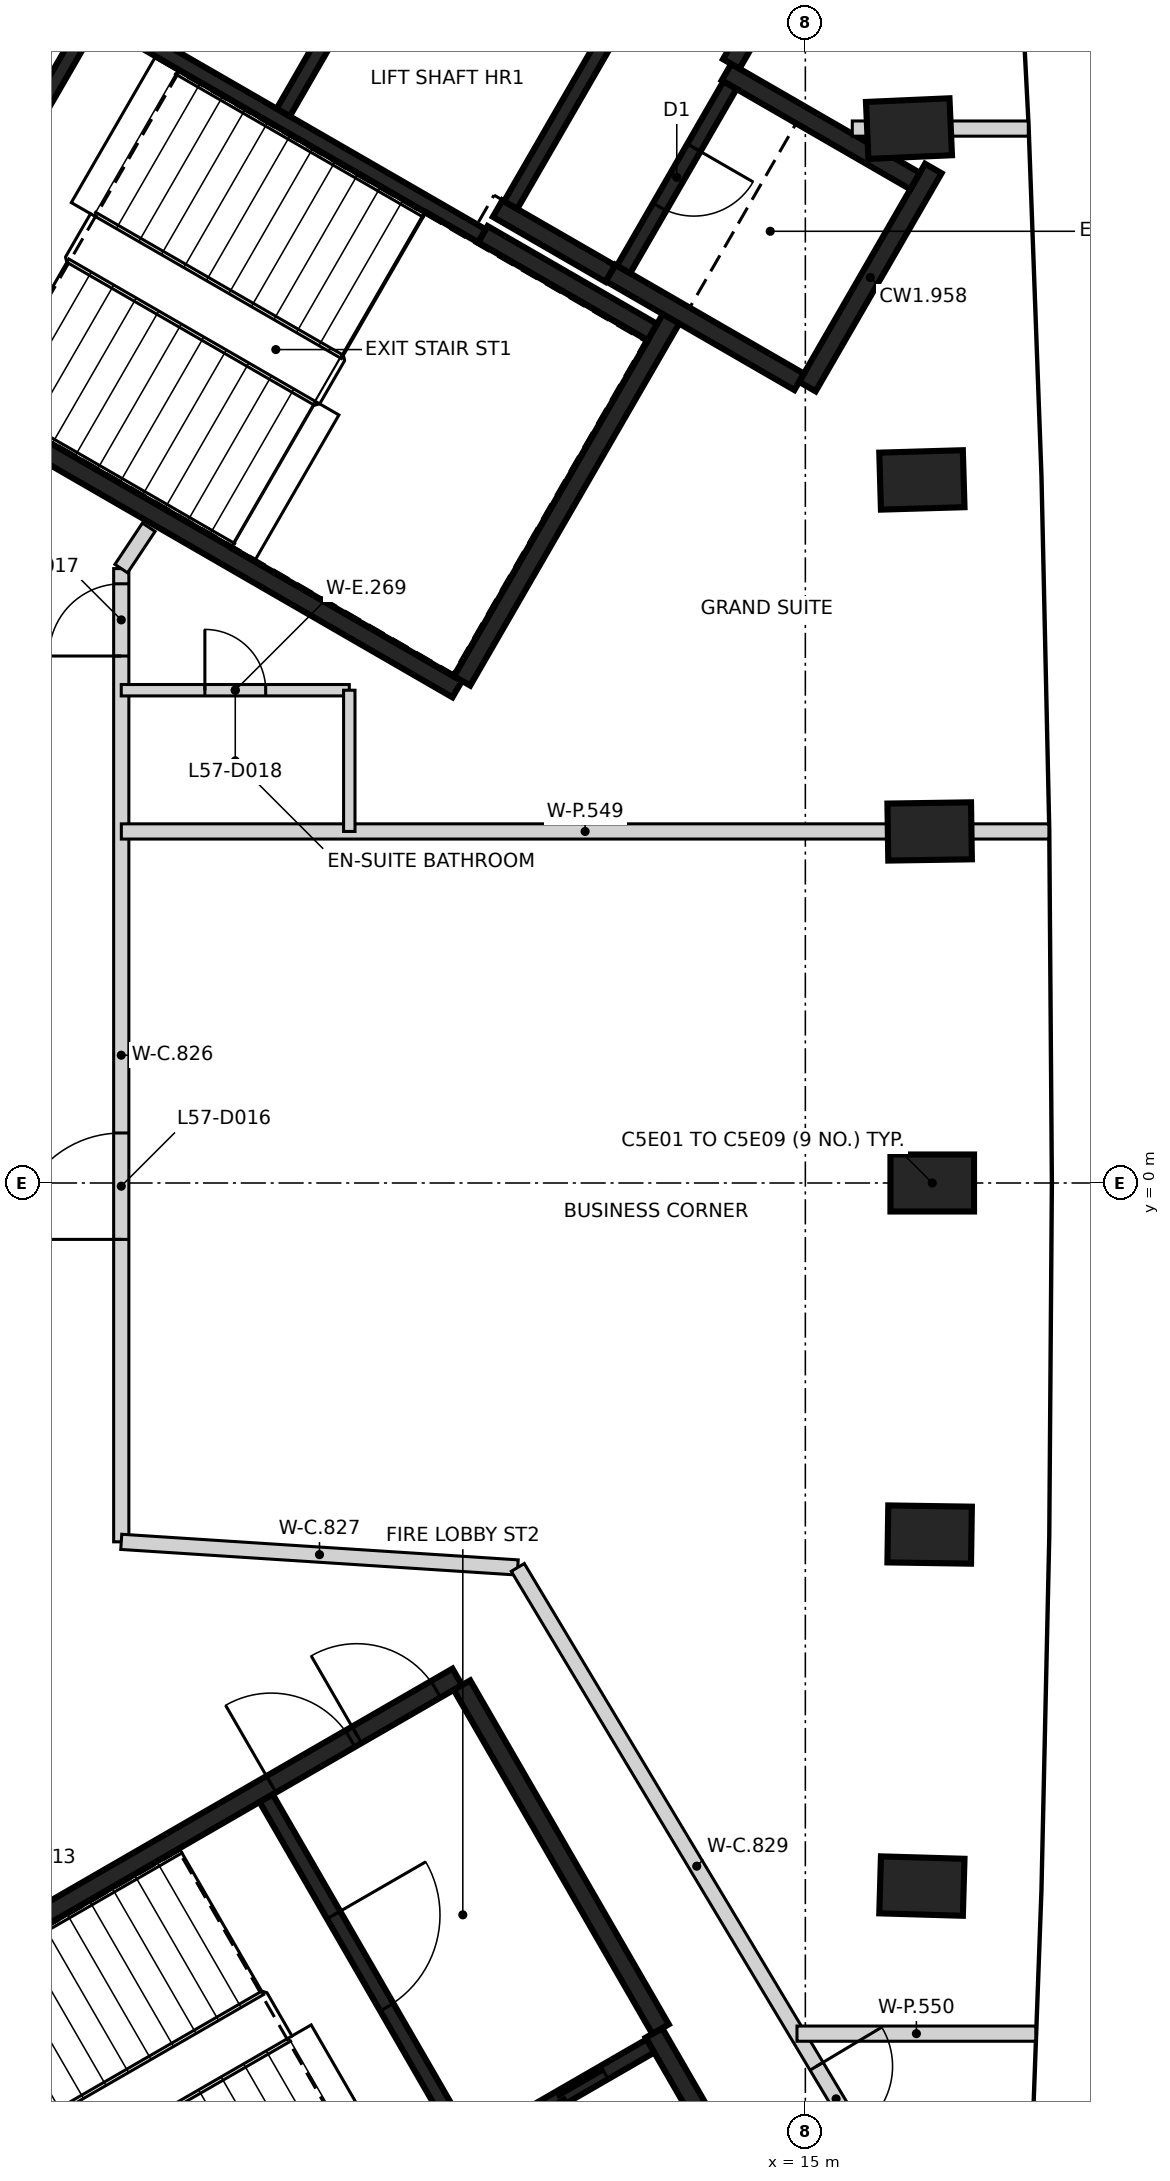
"""IFC4 building model, lengths in metres.
Left out: names, types, materials, properties, quantities, classifications, styles, units other than length and angle.
Written with IfcOpenShell. Run it as: python <this file> out.ifc"""

import sys

from ifc_helpers import new_model, si_unit, direction, frame, frame_2d, origin, origin_2d, place, context, subcontext, project, spatial, rectangle, extrude, element, fill, save


model = new_model("IFC4")
c1 = context("Model", 3, precision=1e-05, world=origin(), true_north=direction((0.0, 1.0)))
c2 = subcontext(c1, "Body", "Model", "MODEL_VIEW")
j1 = project(units=[si_unit("LENGTHUNIT", "METRE"), si_unit("PLANEANGLEUNIT", "RADIAN")], contexts=[c1])
p1 = place(None, origin())
s1 = spatial("IfcSite", under=j1, at=p1, CompositionType="ELEMENT")
p2 = place(p1, origin())
s2 = spatial("IfcBuilding", under=s1, at=p2, CompositionType="ELEMENT")
p3 = place(p2, frame((0.0, 0.0, 228.6)))
s3 = spatial("IfcBuildingStorey", under=s2, at=p3, CompositionType="ELEMENT", Elevation=228.6)
for number, where, z_axis, x_axis in (
    (1, (16.533, -9.25, -0.35), (0.0, 0.0, 1.0), (-1.0, 0.029, 0.0)),
    (2, (16.635, -4.625, -0.35), (0.0, 0.0, 1.0), (-1.0, 0.015, 0.0)),
    (3, (16.669, 0.0, -0.35), (0.0, 0.0, 1.0), (1.0, 0.0, 0.0)),
    (4, (16.635, 4.625, -0.35), (0.0, 0.0, 1.0), (1.0, 0.015, 0.0)),
    (5, (16.533, 9.25, -0.35), (0.0, 0.0, 1.0), (1.0, 0.029, 0.0)),
    (6, (16.363, 13.872, -0.35), (0.0, 0.0, 1.0), (0.999, 0.044, 0.0)),
):
    element("IfcColumn", number, at=place(p3, frame(where, z_axis=z_axis, x_axis=x_axis)), inside=s3, PredefinedType="COLUMN", context=c2, shape_type="SweptSolid", body=[
        extrude(rectangle(XDim=1.1, YDim=0.75, at=origin_2d()), origin(), (0.0, 0.0, 1.0), 3.6),
    ])
p4 = place(p3, frame((10.42, 6.498, 0.0), z_axis=(0.0, 0.0, 1.0), x_axis=(-0.866021906294, 0.500006057782, 0.0)))
e7 = element("IfcWall", 7, at=p4, inside=s3, PredefinedType="SHEAR", context=c2, shape_type="SweptSolid", body=[
    extrude(rectangle(XDim=11.55, YDim=0.25, at=frame_2d((5.775, 0.0))), origin(), (0.0, 0.0, 1.0), 3.25),
])
p5 = place(p4, frame((10.025, 0.0, 0.0)))
e8 = element("IfcOpeningElement", 8, at=p5, cuts=e7, PredefinedType="OPENING", context=c2, shape_type="SweptSolid", body=[
    extrude(rectangle(XDim=1.2, YDim=2.1, at=frame_2d((0.6, 1.05))), frame((0.0, 0.135, 0.0), z_axis=(0.0, -1.0, 0.0), x_axis=(1.0, 0.0, 0.0)), (0.0, 0.0, 1.0), 0.27),
])
p6 = place(p4, frame((8.725, 0.0, 0.0)))
e9 = element("IfcOpeningElement", 9, at=p6, cuts=e7, PredefinedType="OPENING", context=c2, shape_type="SweptSolid", body=[
    extrude(rectangle(XDim=1.2, YDim=2.1, at=frame_2d((0.6, 1.05))), frame((0.0, 0.135, 0.0), z_axis=(0.0, -1.0, 0.0), x_axis=(1.0, 0.0, 0.0)), (0.0, 0.0, 1.0), 0.27),
])
p7 = place(p3, frame((13.238, 11.378, 0.0), z_axis=(0.0, 0.0, 1.0), x_axis=(-0.500008851346, -0.866020293397, 0.0)))
e10 = element("IfcWall", 10, at=p7, inside=s3, PredefinedType="SHEAR", context=c2, shape_type="SweptSolid", body=[
    extrude(rectangle(XDim=5.51, YDim=0.25, at=frame_2d((2.755, 0.0))), origin(), (0.0, 0.0, 1.0), 3.25),
])
p8 = place(p3, frame((16.684, 13.347, 0.0), z_axis=(0.0, 0.0, 1.0), x_axis=(-0.499998874531, -0.866026053573, 0.0)))
e11 = element("IfcWall", 11, at=p8, inside=s3, PredefinedType="SHEAR", context=c2, shape_type="SweptSolid", body=[
    extrude(rectangle(XDim=3.313, YDim=0.25, at=frame_2d((1.656, 0.0))), origin(), (0.0, 0.0, 1.0), 3.25),
])
p9 = place(p3, frame((14.918, 10.54, 0.0), z_axis=(0.0, 0.0, 1.0), x_axis=(-0.866063538972, 0.499933942099, 0.0)))
e12 = element("IfcWall", 12, at=p9, inside=s3, PredefinedType="SHEAR", context=c2, shape_type="SweptSolid", body=[
    extrude(rectangle(XDim=2.865, YDim=0.25, at=frame_2d((1.432, 0.0))), origin(), (0.0, 0.0, 1.0), 3.25),
])
p10 = place(p3, frame((13.963, 14.614, 0.0), z_axis=(0.0, 0.0, 1.0), x_axis=(0.866042235819, -0.499970844928, 0.0)))
e13 = element("IfcWall", 13, at=p10, inside=s3, PredefinedType="SHEAR", context=c2, shape_type="SweptSolid", body=[
    extrude(rectangle(XDim=2.865, YDim=0.25, at=frame_2d((1.432, 0.0))), origin(), (0.0, 0.0, 1.0), 3.25),
])
p11 = place(p3, frame((10.757, 12.481, 0.0), z_axis=(0.0, 0.0, 1.0), x_axis=(0.866022940537, -0.500004266446, 0.0)))
e14 = element("IfcWall", 14, at=p11, inside=s3, PredefinedType="SHEAR", context=c2, shape_type="SweptSolid", body=[
    extrude(rectangle(XDim=2.575, YDim=0.25, at=frame_2d((1.287, 0.0))), origin(), (0.0, 0.0, 1.0), 3.25),
])
p12 = place(p3, frame((12.433, 11.964, 0.0), z_axis=(0.0, 0.0, 1.0), x_axis=(-0.866038183914, 0.499977863513, 0.0)))
e15 = element("IfcWall", 15, at=p12, inside=s3, PredefinedType="SHEAR", context=c2, shape_type="SweptSolid", body=[
    extrude(rectangle(XDim=1.71, YDim=0.25, at=frame_2d((0.855, 0.0))), origin(), (0.0, 0.0, 1.0), 3.25),
])
p13 = place(p3, frame((14.305, 15.207, 0.0), z_axis=(0.0, 0.0, 1.0), x_axis=(-0.499848422343, -0.866112899501, 0.0)))
e16 = element("IfcWall", 16, at=p13, inside=s3, PredefinedType="SHEAR", context=c2, shape_type="SweptSolid", body=[
    extrude(rectangle(XDim=0.559, YDim=0.25, at=frame_2d((0.28, 0.0))), origin(), (0.0, 0.0, 1.0), 3.25),
])
p14 = place(p3, frame((10.743, 12.46, 0.0), z_axis=(0.0, 0.0, 1.0), x_axis=(-0.866018848283, 0.500011354289, 0.0)))
e17 = element("IfcWall", 17, at=p14, inside=s3, PredefinedType="SHEAR", context=c2, shape_type="SweptSolid", body=[
    extrude(rectangle(XDim=5.974, YDim=0.2, at=frame_2d((2.987, 0.0))), origin(), (0.0, 0.0, 1.0), 3.25),
])
p15 = place(p3, frame((3.057, 10.895, 0.0), z_axis=(0.0, 0.0, 1.0), x_axis=(0.500027839223, 0.866009330205, 0.0)))
e18 = element("IfcWall", 18, at=p15, inside=s3, PredefinedType="SHEAR", context=c2, shape_type="SweptSolid", body=[
    extrude(rectangle(XDim=5.098, YDim=0.2, at=frame_2d((2.549, 0.0))), origin(), (0.0, 0.0, 1.0), 3.25),
])
p16 = place(p15, frame((1.774, 0.0, 0.0)))
e19 = element("IfcOpeningElement", 19, at=p16, cuts=e18, PredefinedType="OPENING", context=c2, shape_type="SweptSolid", body=[
    extrude(rectangle(XDim=1.4, YDim=2.1, at=frame_2d((0.7, 1.05))), frame((0.0, 0.11, 0.0), z_axis=(0.0, -1.0, 0.0), x_axis=(1.0, 0.0, 0.0)), (0.0, 0.0, 1.0), 0.22),
])
p17 = place(p3, frame((8.132, 14.084, 0.0), z_axis=(0.0, 0.0, 1.0), x_axis=(0.500030834389, 0.86600760081, 0.0)))
e20 = element("IfcWall", 20, at=p17, inside=s3, PredefinedType="SHEAR", context=c2, shape_type="SweptSolid", body=[
    extrude(rectangle(XDim=3.198, YDim=0.2, at=frame_2d((1.599, 0.0))), origin(), (0.0, 0.0, 1.0), 3.25),
])
p18 = place(p3, frame((14.008, 14.442, 0.0), z_axis=(0.0, 0.0, 1.0), x_axis=(-0.499986818241, -0.866033014143, 0.0)))
e21 = element("IfcWall", 21, at=p18, inside=s3, PredefinedType="SHEAR", context=c2, shape_type="SweptSolid", body=[
    extrude(rectangle(XDim=2.798, YDim=0.2, at=frame_2d((1.399, 0.0))), origin(), (0.0, 0.0, 1.0), 3.25),
])
p19 = place(p18, frame((0.949, 0.0, 0.0)))
e22 = element("IfcOpeningElement", 22, at=p19, cuts=e21, PredefinedType="OPENING", context=c2, shape_type="SweptSolid", body=[
    extrude(rectangle(XDim=0.9, YDim=2.1, at=frame_2d((0.45, 1.05))), frame((0.0, 0.11, 0.0), z_axis=(0.0, -1.0, 0.0), x_axis=(1.0, 0.0, 0.0)), (0.0, 0.0, 1.0), 0.22),
])
p20 = place(p3, frame((12.502, 15.255, 0.0), z_axis=(0.0, 0.0, 1.0), x_axis=(-0.499965018551, -0.866045599391, 0.0)))
e23 = element("IfcWall", 23, at=p20, inside=s3, PredefinedType="SHEAR", context=c2, shape_type="SweptSolid", body=[
    extrude(rectangle(XDim=2.759, YDim=0.2, at=frame_2d((1.379, 0.0))), origin(), (0.0, 0.0, 1.0), 3.25),
])
p21 = place(p3, frame((0.417, -12.273, 0.0), z_axis=(0.0, 0.0, 1.0), x_axis=(0.866021906294, 0.500006057782, 0.0)))
e24 = element("IfcWall", 24, at=p21, inside=s3, PredefinedType="SHEAR", context=c2, shape_type="SweptSolid", body=[
    extrude(rectangle(XDim=11.55, YDim=0.25, at=frame_2d((5.775, 0.0))), origin(), (0.0, 0.0, 1.0), 3.25),
])
p22 = place(p21, frame((10.025, 0.0, 0.0)))
e25 = element("IfcOpeningElement", 25, at=p22, cuts=e24, PredefinedType="OPENING", context=c2, shape_type="SweptSolid", body=[
    extrude(rectangle(XDim=1.2, YDim=2.1, at=frame_2d((0.6, 1.05))), frame((0.0, 0.135, 0.0), z_axis=(0.0, -1.0, 0.0), x_axis=(1.0, 0.0, 0.0)), (0.0, 0.0, 1.0), 0.27),
])
p23 = place(p21, frame((8.725, 0.0, 0.0)))
e26 = element("IfcOpeningElement", 26, at=p23, cuts=e24, PredefinedType="OPENING", context=c2, shape_type="SweptSolid", body=[
    extrude(rectangle(XDim=1.2, YDim=2.1, at=frame_2d((0.6, 1.05))), frame((0.0, 0.135, 0.0), z_axis=(0.0, -1.0, 0.0), x_axis=(1.0, 0.0, 0.0)), (0.0, 0.0, 1.0), 0.27),
])
p24 = place(p3, frame((13.008, -11.181, 0.0), z_axis=(0.0, 0.0, 1.0), x_axis=(0.500001955336, -0.866024274868, 0.0)))
e27 = element("IfcWall", 27, at=p24, inside=s3, PredefinedType="SHEAR", context=c2, shape_type="SweptSolid", body=[
    extrude(rectangle(XDim=6.125, YDim=0.25, at=frame_2d((3.062, 0.0))), origin(), (0.0, 0.0, 1.0), 3.25),
])
p25 = place(p24, frame((3.563, 0.0, 0.0)))
e28 = element("IfcOpeningElement", 28, at=p25, cuts=e27, PredefinedType="OPENING", context=c2, shape_type="SweptSolid", body=[
    extrude(rectangle(XDim=1.0, YDim=2.1, at=frame_2d((0.5, 1.05))), frame((0.0, 0.135, 0.0), z_axis=(0.0, -1.0, 0.0), x_axis=(1.0, 0.0, 0.0)), (0.0, 0.0, 1.0), 0.27),
])
p26 = place(p3, frame((10.483, -6.606, 0.0), z_axis=(0.0, 0.0, 1.0), x_axis=(0.49999885962, -0.866026062182, 0.0)))
e29 = element("IfcWall", 29, at=p26, inside=s3, PredefinedType="SHEAR", context=c2, shape_type="SweptSolid", body=[
    extrude(rectangle(XDim=5.225, YDim=0.25, at=frame_2d((2.612, 0.0))), origin(), (0.0, 0.0, 1.0), 3.25),
])
p27 = place(p3, frame((7.906, -8.094, 0.0), z_axis=(0.0, 0.0, 1.0), x_axis=(0.500027839223, -0.866009330205, 0.0)))
e30 = element("IfcWall", 30, at=p27, inside=s3, PredefinedType="SHEAR", context=c2, shape_type="SweptSolid", body=[
    extrude(rectangle(XDim=5.098, YDim=0.2, at=frame_2d((2.549, 0.0))), origin(), (0.0, 0.0, 1.0), 3.25),
])
p28 = place(p27, frame((1.774, 0.0, 0.0)))
e31 = element("IfcOpeningElement", 31, at=p28, cuts=e30, PredefinedType="OPENING", context=c2, shape_type="SweptSolid", body=[
    extrude(rectangle(XDim=1.4, YDim=2.1, at=frame_2d((0.7, 1.05))), frame((0.0, 0.11, 0.0), z_axis=(0.0, -1.0, 0.0), x_axis=(1.0, 0.0, 0.0)), (0.0, 0.0, 1.0), 0.22),
])
p29 = place(p3, frame((10.666, -12.678, 0.0), z_axis=(0.0, 0.0, 1.0), x_axis=(0.866018407898, 0.500012117035, 0.0)))
e32 = element("IfcWall", 32, at=p29, inside=s3, PredefinedType="SHEAR", context=c2, shape_type="SweptSolid", body=[
    extrude(rectangle(XDim=2.651, YDim=0.2, at=frame_2d((1.325, 0.0))), origin(), (0.0, 0.0, 1.0), 3.25),
])
p30 = place(p29, frame((0.652, 0.0, 0.0)))
e33 = element("IfcOpeningElement", 33, at=p30, cuts=e32, PredefinedType="OPENING", context=c2, shape_type="SweptSolid", body=[
    extrude(rectangle(XDim=1.3, YDim=2.1, at=frame_2d((0.65, 1.05))), frame((0.0, 0.11, 0.0), z_axis=(0.0, -1.0, 0.0), x_axis=(1.0, 0.0, 0.0)), (0.0, 0.0, 1.0), 0.22),
])
p31 = place(p3, frame((6.0, -4.721, 0.0), z_axis=(0.0, 0.0, 1.0), x_axis=(0.0, 1.0, 0.0)))
e34 = element("IfcWall", 34, at=p31, inside=s3, PredefinedType="PARTITIONING", context=c2, shape_type="SweptSolid", body=[
    extrude(rectangle(XDim=12.804, YDim=0.2, at=frame_2d((6.402, 0.0))), origin(), (0.0, 0.0, 1.0), 3.25),
])
p32 = place(p31, frame((3.979, 0.0, 0.0)))
e35 = element("IfcOpeningElement", 35, at=p32, cuts=e34, PredefinedType="OPENING", context=c2, shape_type="SweptSolid", body=[
    extrude(rectangle(XDim=1.4, YDim=2.1, at=frame_2d((0.7, 1.05))), frame((0.0, 0.11, 0.0), z_axis=(0.0, -1.0, 0.0), x_axis=(1.0, 0.0, 0.0)), (0.0, 0.0, 1.0), 0.22),
])
p33 = place(p31, frame((11.654, 0.0, 0.0)))
e36 = element("IfcOpeningElement", 36, at=p33, cuts=e34, PredefinedType="OPENING", context=c2, shape_type="SweptSolid", body=[
    extrude(rectangle(XDim=0.95, YDim=2.1, at=frame_2d((0.475, 1.05))), frame((0.0, 0.11, 0.0), z_axis=(0.0, -1.0, 0.0), x_axis=(1.0, 0.0, 0.0)), (0.0, 0.0, 1.0), 0.22),
])
p34 = place(p3, frame((6.0, -4.721, 0.0), z_axis=(0.0, 0.0, 1.0), x_axis=(0.997917460423, -0.064503815251, 0.0)))
e37 = element("IfcWall", 37, at=p34, inside=s3, PredefinedType="PARTITIONING", context=c2, shape_type="SweptSolid", body=[
    extrude(rectangle(XDim=5.227, YDim=0.2, at=frame_2d((2.614, 0.0))), origin(), (0.0, 0.0, 1.0), 3.25),
])
p35 = place(p3, frame((6.0, 8.083, 0.0), z_axis=(0.0, 0.0, 1.0), x_axis=(0.553665201502, 0.832739361773, 0.0)))
e38 = element("IfcWall", 38, at=p35, inside=s3, PredefinedType="PARTITIONING", context=c2, shape_type="SweptSolid", body=[
    extrude(rectangle(XDim=0.654, YDim=0.2, at=frame_2d((0.327, 0.0))), origin(), (0.0, 0.0, 1.0), 3.25),
])
p36 = place(p3, frame((11.217, -5.058, 0.0), z_axis=(0.0, 0.0, 1.0), x_axis=(0.513856906336, -0.857875911662, 0.0)))
e39 = element("IfcWall", 39, at=p36, inside=s3, PredefinedType="PARTITIONING", context=c2, shape_type="SweptSolid", body=[
    extrude(rectangle(XDim=9.163, YDim=0.2, at=frame_2d((4.581, 0.0))), origin(), (0.0, 0.0, 1.0), 3.25),
])
p37 = place(p36, frame((7.65, 0.0, 0.0)))
e40 = element("IfcOpeningElement", 40, at=p37, cuts=e39, PredefinedType="OPENING", context=c2, shape_type="SweptSolid", body=[
    extrude(rectangle(XDim=1.0, YDim=2.1, at=frame_2d((0.5, 1.05))), frame((0.0, 0.11, 0.0), z_axis=(0.0, -1.0, 0.0), x_axis=(1.0, 0.0, 0.0)), (0.0, 0.0, 1.0), 0.22),
])
p38 = place(p3, frame((6.001, 4.625, 0.0), z_axis=(0.0, 0.0, 1.0), x_axis=(1.0, 0.0, 0.0)))
e41 = element("IfcWall", 41, at=p38, inside=s3, PredefinedType="PARTITIONING", context=c2, shape_type="SweptSolid", body=[
    extrude(rectangle(XDim=12.203, YDim=0.2, at=frame_2d((6.102, 0.0))), origin(), (0.0, 0.0, 1.0), 3.25),
])
p39 = place(p3, frame((14.89, -11.191, 0.0), z_axis=(0.0, 0.0, 1.0), x_axis=(1.0, 0.0, 0.0)))
e42 = element("IfcWall", 42, at=p39, inside=s3, PredefinedType="PARTITIONING", context=c2, shape_type="SweptSolid", body=[
    extrude(rectangle(XDim=3.142, YDim=0.2, at=frame_2d((1.571, 0.0))), origin(), (0.0, 0.0, 1.0), 2.35),
])
p40 = place(p3, frame((15.618, 13.872, 0.0), z_axis=(0.0, 0.0, 1.0), x_axis=(1.0, 0.0, 0.0)))
e43 = element("IfcWall", 43, at=p40, inside=s3, PredefinedType="PARTITIONING", context=c2, shape_type="SweptSolid", body=[
    extrude(rectangle(XDim=2.316, YDim=0.2, at=frame_2d((1.158, 0.0))), origin(), (0.0, 0.0, 1.0), 3.25),
])
p41 = place(p3, frame((6.0, 6.483, 0.0), z_axis=(0.0, 0.0, 1.0), x_axis=(1.0, 0.0, 0.0)))
e44 = element("IfcWall", 44, at=p41, inside=s3, PredefinedType="PARTITIONING", context=c2, shape_type="SweptSolid", body=[
    extrude(rectangle(XDim=3.0, YDim=0.15, at=frame_2d((1.5, 0.0))), origin(), (0.0, 0.0, 1.0), 3.25),
])
p42 = place(p41, frame((1.1, 0.0, 0.0)))
e45 = element("IfcOpeningElement", 45, at=p42, cuts=e44, PredefinedType="OPENING", context=c2, shape_type="SweptSolid", body=[
    extrude(rectangle(XDim=0.8, YDim=2.1, at=frame_2d((0.4, 1.05))), frame((0.0, 0.085, 0.0), z_axis=(0.0, -1.0, 0.0), x_axis=(1.0, 0.0, 0.0)), (0.0, 0.0, 1.0), 0.17),
])
p43 = place(p3, frame((9.0, 4.625, 0.0), z_axis=(0.0, 0.0, 1.0), x_axis=(0.0, 1.0, 0.0)))
e46 = element("IfcWall", 46, at=p43, inside=s3, PredefinedType="PARTITIONING", context=c2, shape_type="SweptSolid", body=[
    extrude(rectangle(XDim=1.858, YDim=0.15, at=frame_2d((0.929, 0.0))), origin(), (0.0, 0.0, 1.0), 3.25),
])
p44 = place(p19, origin())
e47 = element("IfcDoor", 47, at=p44, inside=s3, OperationType="SINGLE_SWING_RIGHT", PredefinedType="DOOR", context=c2, shape_type="SweptSolid", body=[
    extrude(rectangle(XDim=0.9, YDim=2.1, at=frame_2d((0.45, 1.05))), frame((0.0, 0.025, 0.0), z_axis=(0.0, -1.0, 0.0), x_axis=(1.0, 0.0, 0.0)), (0.0, 0.0, 1.0), 0.05),
])
fill(e22, e47)
p45 = place(p30, origin())
e48 = element("IfcDoor", 48, at=p45, inside=s3, OperationType="SLIDING_TO_RIGHT", PredefinedType="DOOR", context=c2, shape_type="SweptSolid", body=[
    extrude(rectangle(XDim=1.3, YDim=2.1, at=frame_2d((0.65, 1.05))), frame((0.0, 0.025, 0.0), z_axis=(0.0, -1.0, 0.0), x_axis=(1.0, 0.0, 0.0)), (0.0, 0.0, 1.0), 0.05),
])
fill(e33, e48)
p46 = place(p22, origin())
e49 = element("IfcDoor", 49, at=p46, inside=s3, OperationType="SINGLE_SWING_LEFT", PredefinedType="DOOR", context=c2, shape_type="SweptSolid", body=[
    extrude(rectangle(XDim=1.2, YDim=2.1, at=frame_2d((0.6, 1.05))), frame((0.0, 0.025, 0.0), z_axis=(0.0, -1.0, 0.0), x_axis=(1.0, 0.0, 0.0)), (0.0, 0.0, 1.0), 0.05),
])
fill(e25, e49)
p47 = place(p23, origin())
e50 = element("IfcDoor", 50, at=p47, inside=s3, OperationType="SINGLE_SWING_RIGHT", PredefinedType="DOOR", context=c2, shape_type="SweptSolid", body=[
    extrude(rectangle(XDim=1.2, YDim=2.1, at=frame_2d((0.6, 1.05))), frame((0.0, 0.025, 0.0), z_axis=(0.0, -1.0, 0.0), x_axis=(1.0, 0.0, 0.0)), (0.0, 0.0, 1.0), 0.05),
])
fill(e26, e50)
p48 = place(p28, origin())
e51 = element("IfcDoor", 51, at=p48, inside=s3, OperationType="SINGLE_SWING_RIGHT", PredefinedType="DOOR", context=c2, shape_type="SweptSolid", body=[
    extrude(rectangle(XDim=1.4, YDim=2.1, at=frame_2d((0.7, 1.05))), frame((0.0, 0.025, 0.0), z_axis=(0.0, -1.0, 0.0), x_axis=(1.0, 0.0, 0.0)), (0.0, 0.0, 1.0), 0.05),
])
fill(e31, e51)
p49 = place(p37, frame((1.0, 0.0, 0.0), z_axis=(0.0, 0.0, 1.0), x_axis=(-1.0, 0.0, 0.0)))
e52 = element("IfcDoor", 52, at=p49, inside=s3, OperationType="SINGLE_SWING_LEFT", PredefinedType="DOOR", context=c2, shape_type="SweptSolid", body=[
    extrude(rectangle(XDim=1.0, YDim=2.1, at=frame_2d((0.5, 1.05))), frame((0.0, 0.025, 0.0), z_axis=(0.0, -1.0, 0.0), x_axis=(1.0, 0.0, 0.0)), (0.0, 0.0, 1.0), 0.05),
])
fill(e40, e52)
p50 = place(p32, frame((1.4, 0.0, 0.0), z_axis=(0.0, 0.0, 1.0), x_axis=(-1.0, 0.0, 0.0)))
e53 = element("IfcDoor", 53, at=p50, inside=s3, OperationType="DOUBLE_DOOR_SINGLE_SWING", PredefinedType="DOOR", context=c2, shape_type="SweptSolid", body=[
    extrude(rectangle(XDim=1.4, YDim=2.1, at=frame_2d((0.7, 1.05))), frame((0.0, 0.025, 0.0), z_axis=(0.0, -1.0, 0.0), x_axis=(1.0, 0.0, 0.0)), (0.0, 0.0, 1.0), 0.05),
])
fill(e35, e53)
p51 = place(p33, frame((0.95, 0.0, 0.0), z_axis=(0.0, 0.0, 1.0), x_axis=(-1.0, 0.0, 0.0)))
e54 = element("IfcDoor", 54, at=p51, inside=s3, OperationType="SINGLE_SWING_LEFT", PredefinedType="DOOR", context=c2, shape_type="SweptSolid", body=[
    extrude(rectangle(XDim=0.95, YDim=2.1, at=frame_2d((0.475, 1.05))), frame((0.0, 0.025, 0.0), z_axis=(0.0, -1.0, 0.0), x_axis=(1.0, 0.0, 0.0)), (0.0, 0.0, 1.0), 0.05),
])
fill(e36, e54)
p52 = place(p42, origin())
e55 = element("IfcDoor", 55, at=p52, inside=s3, OperationType="SINGLE_SWING_LEFT", PredefinedType="DOOR", context=c2, shape_type="SweptSolid", body=[
    extrude(rectangle(XDim=0.8, YDim=2.1, at=frame_2d((0.4, 1.05))), frame((0.0, 0.025, 0.0), z_axis=(0.0, -1.0, 0.0), x_axis=(1.0, 0.0, 0.0)), (0.0, 0.0, 1.0), 0.05),
])
fill(e45, e55)
save(model, sys.argv[1])
